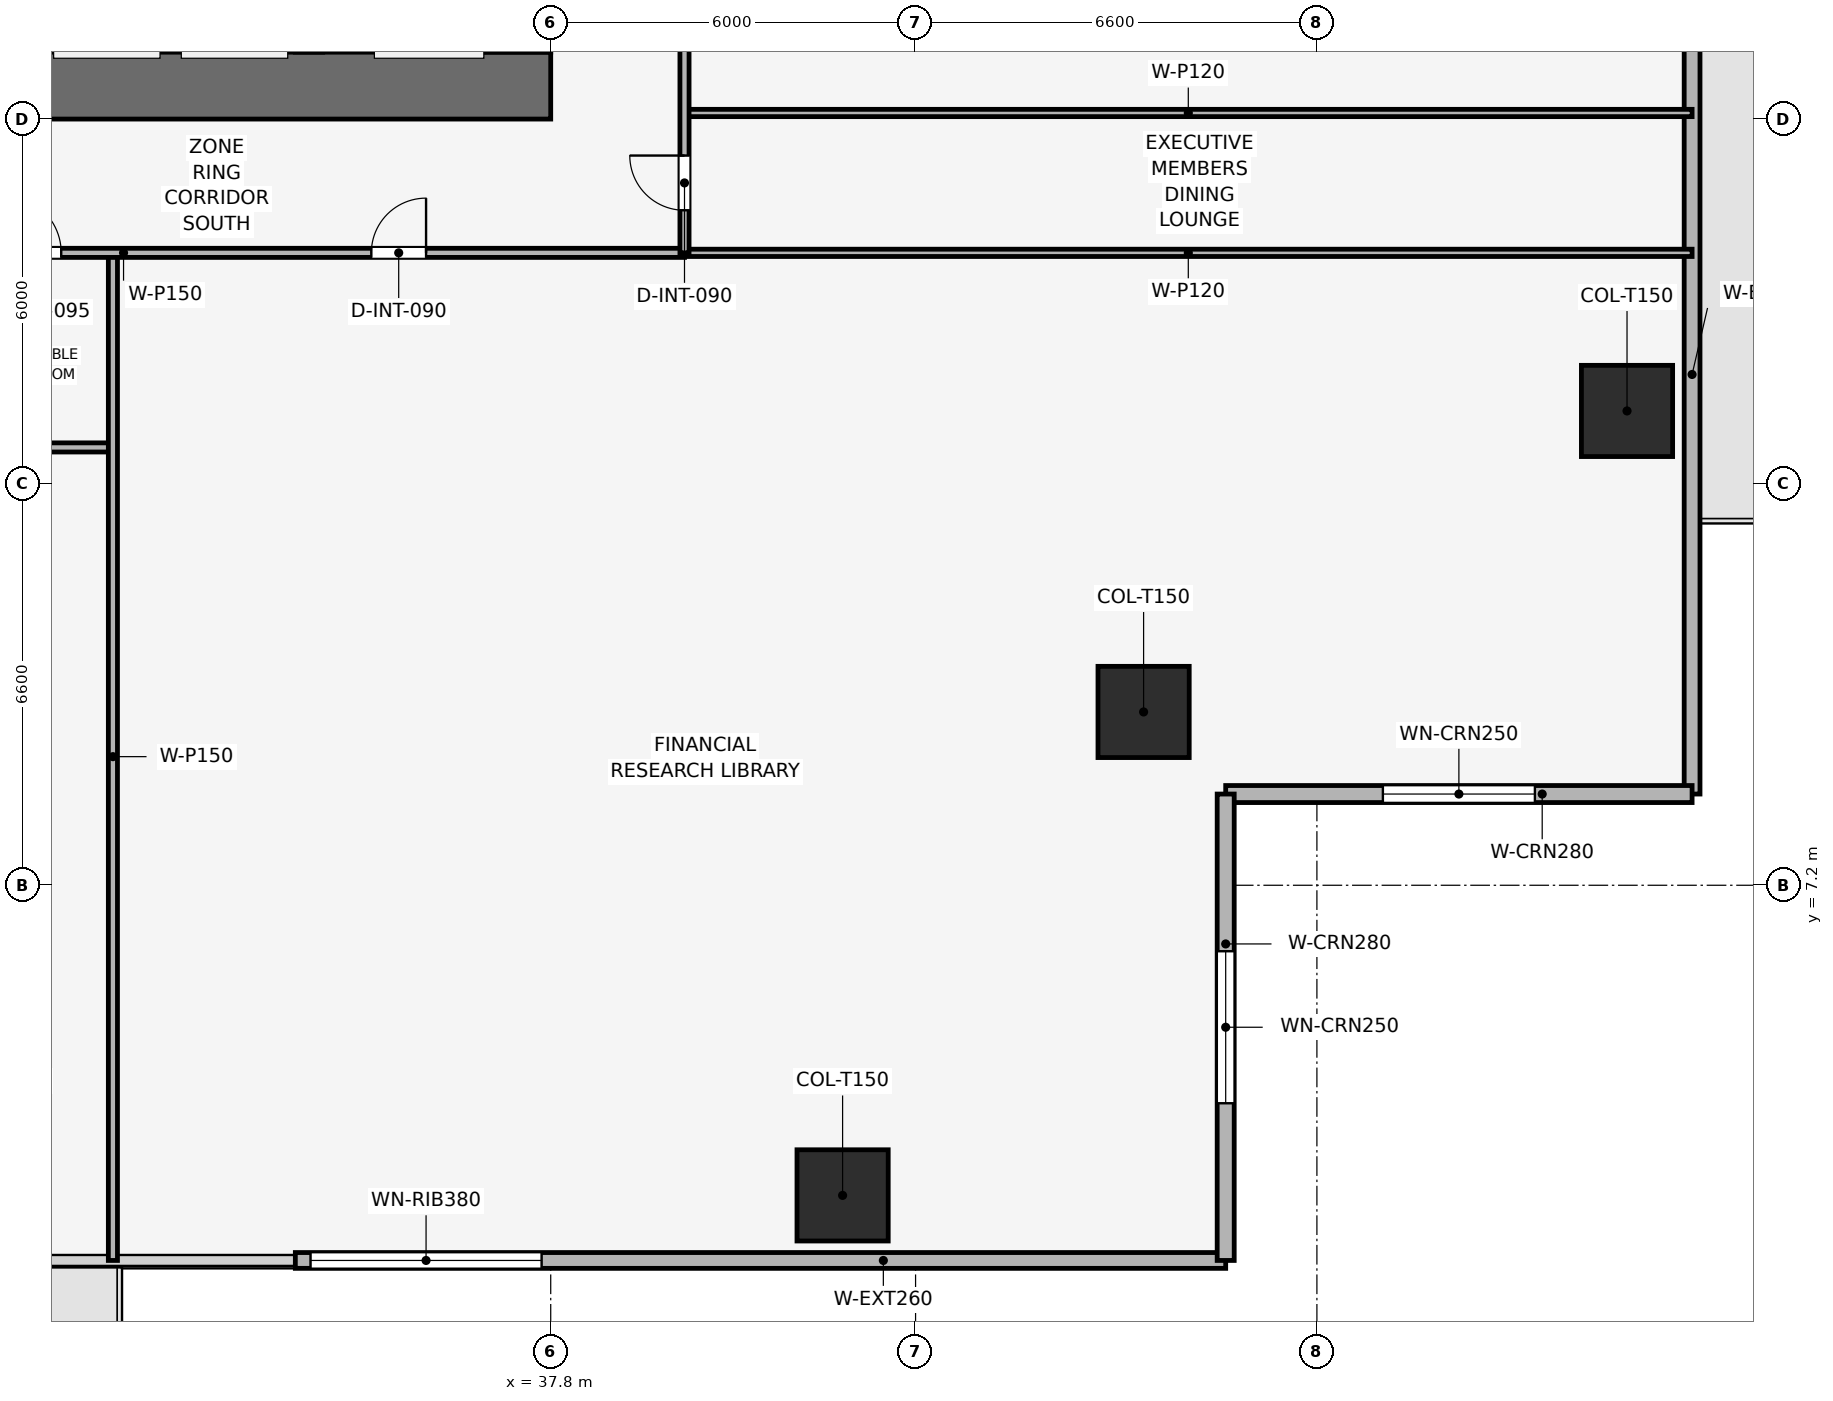
"""IFC4 building model, lengths in metres.
Left out: names, types, materials, properties, quantities, classifications, styles, units other than length and angle.
Written with IfcOpenShell. Run it as: python <this file> out.ifc"""

import sys

from ifc_helpers import new_model, si_unit, direction, frame, frame_2d, origin, origin_2d, place, context, subcontext, project, spatial, rectangle, extrude, element, fill, save


model = new_model("IFC4")
c1 = context("Model", 3, precision=1e-05, world=origin(), true_north=direction((0.0, 1.0)))
c2 = subcontext(c1, "Body", "Model", "MODEL_VIEW")
j1 = project(units=[si_unit("LENGTHUNIT", "METRE"), si_unit("PLANEANGLEUNIT", "RADIAN")], contexts=[c1])
p1 = place(None, origin())
s1 = spatial("IfcSite", under=j1, at=p1, CompositionType="ELEMENT")
p2 = place(p1, origin())
s2 = spatial("IfcBuilding", under=s1, at=p2, CompositionType="ELEMENT")
p3 = place(p2, frame((0.0, 0.0, 65.1)))
s3 = spatial("IfcBuildingStorey", under=s2, at=p3, CompositionType="ELEMENT", Elevation=65.1)
p4 = place(p3, frame((19.8, 20.35, 0.0), z_axis=(0.0, 0.0, 1.0), x_axis=(1.0, 0.0, 0.0)))
e1 = element("IfcWall", 1, at=p4, inside=s3, PredefinedType="SHEAR", context=c2, shape_type="SweptSolid", body=[
    extrude(rectangle(XDim=18.0, YDim=1.1, at=frame_2d((9.0, 0.0))), origin(), (0.0, 0.0, 1.0), 3.9),
])
p5 = place(p4, frame((8.4, 0.0, 0.0)))
e2 = element("IfcOpeningElement", 2, at=p5, cuts=e1, PredefinedType="OPENING", context=c2, shape_type="SweptSolid", body=[
    extrude(rectangle(XDim=1.2, YDim=2.2, at=frame_2d((0.6, 1.1))), frame((0.0, 0.56, 0.0), z_axis=(0.0, -1.0, 0.0), x_axis=(1.0, 0.0, 0.0)), (0.0, 0.0, 1.0), 1.12),
])
p6 = place(p3, frame((37.25, 20.9, 0.0), z_axis=(0.0, 0.0, 1.0), x_axis=(0.0, 1.0, 0.0)))
e3 = element("IfcWall", 3, at=p6, inside=s3, PredefinedType="SHEAR", context=c2, shape_type="SweptSolid", body=[
    extrude(rectangle(XDim=15.8, YDim=1.1, at=frame_2d((7.9, 0.0))), origin(), (0.0, 0.0, 1.0), 3.9),
])
p7 = place(p6, frame((4.4, 0.0, 0.0)))
e4 = element("IfcOpeningElement", 4, at=p7, cuts=e3, PredefinedType="OPENING", context=c2, shape_type="SweptSolid", body=[
    extrude(rectangle(XDim=1.1, YDim=2.15, at=frame_2d((0.55, 1.075))), frame((0.0, 0.56, 0.0), z_axis=(0.0, -1.0, 0.0), x_axis=(1.0, 0.0, 0.0)), (0.0, 0.0, 1.0), 1.12),
])
p8 = place(p3, frame((33.825, 20.9, 0.0), z_axis=(0.0, 0.0, 1.0), x_axis=(0.0, 1.0, 0.0)))
e5 = element("IfcWall", 5, at=p8, inside=s3, PredefinedType="SHEAR", context=c2, shape_type="SweptSolid", body=[
    extrude(rectangle(XDim=15.8, YDim=0.45, at=frame_2d((7.9, 0.0))), origin(), (0.0, 0.0, 1.0), 3.9),
])
for number, where, z_axis, x_axis in (
    (6, (42.6, 2.1, 0.003), (0.0, 0.0, 1.0), (1.0, 0.0, 0.0)),
    (7, (55.5, 15.0, 0.003), (0.0, 0.0, 1.0), (1.0, 0.0, 0.0)),
    (8, (47.55, 10.05, 0.003), (0.0, 0.0, 1.0), (1.0, 0.0, 0.0)),
):
    element("IfcColumn", number, at=place(p3, frame(where, z_axis=z_axis, x_axis=x_axis)), inside=s3, PredefinedType="COLUMN", context=c2, shape_type="SweptSolid", body=[
        extrude(rectangle(XDim=1.5, YDim=1.5, at=origin_2d()), origin(), (0.0, 0.0, 1.0), 3.644),
    ])
p9 = place(p3, frame((48.9, 1.03, 0.0), z_axis=(0.0, 0.0, 1.0), x_axis=(-1.0, 0.0, 0.0)))
e9 = element("IfcWall", 9, at=p9, inside=s3, PredefinedType="SOLIDWALL", context=c2, shape_type="SweptSolid", body=[
    extrude(rectangle(XDim=15.3, YDim=0.26, at=frame_2d((7.65, 0.0))), origin(), (0.0, 0.0, 1.0), 3.65),
])
p10 = place(p9, frame((11.25, 0.0, 0.9)))
e10 = element("IfcOpeningElement", 10, at=p10, cuts=e9, PredefinedType="OPENING", context=c2, shape_type="SweptSolid", body=[
    extrude(rectangle(XDim=3.8, YDim=1.9, at=frame_2d((1.9, 0.95))), frame((0.0, 0.14, 0.0), z_axis=(0.0, -1.0, 0.0), x_axis=(1.0, 0.0, 0.0)), (0.0, 0.0, 1.0), 0.28),
])
p11 = place(p3, frame((56.57, 24.0, 0.0), z_axis=(0.0, 0.0, 1.0), x_axis=(0.0, -1.0, 0.0)))
e11 = element("IfcWall", 11, at=p11, inside=s3, PredefinedType="SOLIDWALL", context=c2, shape_type="SweptSolid", body=[
    extrude(rectangle(XDim=15.3, YDim=0.26, at=frame_2d((7.65, 0.0))), origin(), (0.0, 0.0, 1.0), 3.65),
])
p12 = place(p11, frame((0.25, 0.0, 0.0)))
e12 = element("IfcOpeningElement", 12, at=p12, cuts=e11, PredefinedType="OPENING", context=c2, shape_type="SweptSolid", body=[
    extrude(rectangle(XDim=1.1, YDim=2.2, at=frame_2d((0.55, 1.1))), frame((0.0, 0.14, 0.0), z_axis=(0.0, -1.0, 0.0), x_axis=(1.0, 0.0, 0.0)), (0.0, 0.0, 1.0), 0.28),
])
p13 = place(p3, frame((56.57, 8.7, 0.0), z_axis=(0.0, 0.0, 1.0), x_axis=(-1.0, 0.0, 0.0)))
e13 = element("IfcWall", 13, at=p13, inside=s3, PredefinedType="SOLIDWALL", context=c2, shape_type="SweptSolid", body=[
    extrude(rectangle(XDim=7.67, YDim=0.28, at=frame_2d((3.835, 0.0))), origin(), (0.0, 0.0, 1.0), 3.65),
])
p14 = place(p13, frame((2.585, 0.0, 0.9)))
e14 = element("IfcOpeningElement", 14, at=p14, cuts=e13, PredefinedType="OPENING", context=c2, shape_type="SweptSolid", body=[
    extrude(rectangle(XDim=2.5, YDim=1.9, at=frame_2d((1.25, 0.95))), frame((0.0, 0.15, 0.0), z_axis=(0.0, -1.0, 0.0), x_axis=(1.0, 0.0, 0.0)), (0.0, 0.0, 1.0), 0.3),
])
p15 = place(p3, frame((48.9, 8.7, 0.0), z_axis=(0.0, 0.0, 1.0), x_axis=(0.0, -1.0, 0.0)))
e15 = element("IfcWall", 15, at=p15, inside=s3, PredefinedType="SOLIDWALL", context=c2, shape_type="SweptSolid", body=[
    extrude(rectangle(XDim=7.67, YDim=0.28, at=frame_2d((3.835, 0.0))), origin(), (0.0, 0.0, 1.0), 3.65),
])
p16 = place(p15, frame((2.585, 0.0, 0.9)))
e16 = element("IfcOpeningElement", 16, at=p16, cuts=e15, PredefinedType="OPENING", context=c2, shape_type="SweptSolid", body=[
    extrude(rectangle(XDim=2.5, YDim=1.9, at=frame_2d((1.25, 0.95))), frame((0.0, 0.15, 0.0), z_axis=(0.0, -1.0, 0.0), x_axis=(1.0, 0.0, 0.0)), (0.0, 0.0, 1.0), 0.3),
])
p17 = place(p3, frame((22.2, 14.4, 0.0), z_axis=(0.0, 0.0, 1.0), x_axis=(1.0, 0.0, 0.0)))
e17 = element("IfcWall", 17, at=p17, inside=s3, PredefinedType="PARTITIONING", context=c2, shape_type="SweptSolid", body=[
    extrude(rectangle(XDim=8.4, YDim=0.15, at=frame_2d((4.2, 0.0))), origin(), (0.0, 0.0, 1.0), 3.085),
])
p18 = place(p3, frame((30.6, 1.03, 0.0), z_axis=(0.0, 0.0, 1.0), x_axis=(0.0, 1.0, 0.0)))
e18 = element("IfcWall", 18, at=p18, inside=s3, PredefinedType="PARTITIONING", context=c2, shape_type="SweptSolid", body=[
    extrude(rectangle(XDim=16.57, YDim=0.15, at=frame_2d((8.285, 0.0))), origin(), (0.0, 0.0, 1.0), 2.935),
])
for number, where, z_axis, x_axis in (
    (19, (40.0, 17.6, 0.0), (0.0, 0.0, 1.0), (1.0, 0.0, 0.0)),
    (20, (40.0, 19.9, 0.0), (0.0, 0.0, 1.0), (1.0, 0.0, 0.0)),
):
    element("IfcWall", number, at=place(p3, frame(where, z_axis=z_axis, x_axis=x_axis)), inside=s3, PredefinedType="PARTITIONING", context=c2, shape_type="SweptSolid", body=[
        extrude(rectangle(XDim=16.57, YDim=0.12, at=frame_2d((8.285, 0.0))), origin(), (0.0, 0.0, 1.0), 2.935),
    ])
p19 = place(p3, frame((17.6, 17.6, 0.0), z_axis=(0.0, 0.0, 1.0), x_axis=(1.0, 0.0, 0.0)))
e21 = element("IfcWall", 21, at=p19, inside=s3, PredefinedType="PARTITIONING", context=c2, shape_type="SweptSolid", body=[
    extrude(rectangle(XDim=22.4, YDim=0.15, at=frame_2d((11.2, 0.0))), origin(), (0.0, 0.0, 1.0), 3.085),
])
p20 = place(p19, frame((1.85, 0.0, 0.0)))
e22 = element("IfcOpeningElement", 22, at=p20, cuts=e21, PredefinedType="OPENING", context=c2, shape_type="SweptSolid", body=[
    extrude(rectangle(XDim=0.9, YDim=2.1, at=frame_2d((0.45, 1.05))), frame((0.0, 0.085, 0.0), z_axis=(0.0, -1.0, 0.0), x_axis=(1.0, 0.0, 0.0)), (0.0, 0.0, 1.0), 0.17),
])
p21 = place(p19, frame((5.55, 0.0, 0.0)))
e23 = element("IfcOpeningElement", 23, at=p21, cuts=e21, PredefinedType="OPENING", context=c2, shape_type="SweptSolid", body=[
    extrude(rectangle(XDim=0.9, YDim=2.1, at=frame_2d((0.45, 1.05))), frame((0.0, 0.085, 0.0), z_axis=(0.0, -1.0, 0.0), x_axis=(1.0, 0.0, 0.0)), (0.0, 0.0, 1.0), 0.17),
])
p22 = place(p19, frame((8.45, 0.0, 0.0)))
e24 = element("IfcOpeningElement", 24, at=p22, cuts=e21, PredefinedType="OPENING", context=c2, shape_type="SweptSolid", body=[
    extrude(rectangle(XDim=0.9, YDim=2.1, at=frame_2d((0.45, 1.05))), frame((0.0, 0.085, 0.0), z_axis=(0.0, -1.0, 0.0), x_axis=(1.0, 0.0, 0.0)), (0.0, 0.0, 1.0), 0.17),
])
p23 = place(p19, frame((11.2, 0.0, 0.0)))
e25 = element("IfcOpeningElement", 25, at=p23, cuts=e21, PredefinedType="OPENING", context=c2, shape_type="SweptSolid", body=[
    extrude(rectangle(XDim=0.95, YDim=2.1, at=frame_2d((0.475, 1.05))), frame((0.0, 0.085, 0.0), z_axis=(0.0, -1.0, 0.0), x_axis=(1.0, 0.0, 0.0)), (0.0, 0.0, 1.0), 0.17),
])
p24 = place(p19, frame((17.25, 0.0, 0.0)))
e26 = element("IfcOpeningElement", 26, at=p24, cuts=e21, PredefinedType="OPENING", context=c2, shape_type="SweptSolid", body=[
    extrude(rectangle(XDim=0.9, YDim=2.1, at=frame_2d((0.45, 1.05))), frame((0.0, 0.085, 0.0), z_axis=(0.0, -1.0, 0.0), x_axis=(1.0, 0.0, 0.0)), (0.0, 0.0, 1.0), 0.17),
])
p25 = place(p3, frame((40.0, 17.6, 0.0), z_axis=(0.0, 0.0, 1.0), x_axis=(0.0, 1.0, 0.0)))
e27 = element("IfcWall", 27, at=p25, inside=s3, PredefinedType="PARTITIONING", context=c2, shape_type="SweptSolid", body=[
    extrude(rectangle(XDim=22.4, YDim=0.15, at=frame_2d((11.2, 0.0))), origin(), (0.0, 0.0, 1.0), 3.085),
])
p26 = place(p25, frame((0.7, 0.0, 0.0)))
e28 = element("IfcOpeningElement", 28, at=p26, cuts=e27, PredefinedType="OPENING", context=c2, shape_type="SweptSolid", body=[
    extrude(rectangle(XDim=0.9, YDim=2.1, at=frame_2d((0.45, 1.05))), frame((0.0, 0.085, 0.0), z_axis=(0.0, -1.0, 0.0), x_axis=(1.0, 0.0, 0.0)), (0.0, 0.0, 1.0), 0.17),
])
p27 = place(p25, frame((4.699, 0.0, 0.0)))
e29 = element("IfcOpeningElement", 29, at=p27, cuts=e27, PredefinedType="OPENING", context=c2, shape_type="SweptSolid", body=[
    extrude(rectangle(XDim=0.9, YDim=2.1, at=frame_2d((0.45, 1.05))), frame((0.0, 0.085, 0.0), z_axis=(0.0, -1.0, 0.0), x_axis=(1.0, 0.0, 0.0)), (0.0, 0.0, 1.0), 0.17),
])
p28 = place(p25, frame((10.692, 0.0, 0.0)))
e30 = element("IfcOpeningElement", 30, at=p28, cuts=e27, PredefinedType="OPENING", context=c2, shape_type="SweptSolid", body=[
    extrude(rectangle(XDim=0.9, YDim=2.1, at=frame_2d((0.45, 1.05))), frame((0.0, 0.085, 0.0), z_axis=(0.0, -1.0, 0.0), x_axis=(1.0, 0.0, 0.0)), (0.0, 0.0, 1.0), 0.17),
])
p29 = place(p25, frame((17.892, 0.0, 0.0)))
e31 = element("IfcOpeningElement", 31, at=p29, cuts=e27, PredefinedType="OPENING", context=c2, shape_type="SweptSolid", body=[
    extrude(rectangle(XDim=0.9, YDim=2.1, at=frame_2d((0.45, 1.05))), frame((0.0, 0.085, 0.0), z_axis=(0.0, -1.0, 0.0), x_axis=(1.0, 0.0, 0.0)), (0.0, 0.0, 1.0), 0.17),
])
p30 = place(p10, origin())
e32 = element("IfcWindow", 32, at=p30, inside=s3, PartitioningType="SINGLE_PANEL", PredefinedType="WINDOW", context=c2, shape_type="SweptSolid", body=[
    extrude(rectangle(XDim=3.8, YDim=1.9, at=frame_2d((1.9, 0.95))), frame((0.0, 0.03, 0.0), z_axis=(0.0, -1.0, 0.0), x_axis=(1.0, 0.0, 0.0)), (0.0, 0.0, 1.0), 0.06),
])
fill(e10, e32)
p31 = place(p14, origin())
e33 = element("IfcWindow", 33, at=p31, inside=s3, PartitioningType="SINGLE_PANEL", PredefinedType="WINDOW", context=c2, shape_type="SweptSolid", body=[
    extrude(rectangle(XDim=2.5, YDim=1.9, at=frame_2d((1.25, 0.95))), frame((0.0, 0.03, 0.0), z_axis=(0.0, -1.0, 0.0), x_axis=(1.0, 0.0, 0.0)), (0.0, 0.0, 1.0), 0.06),
])
fill(e14, e33)
p32 = place(p16, origin())
e34 = element("IfcWindow", 34, at=p32, inside=s3, PartitioningType="SINGLE_PANEL", PredefinedType="WINDOW", context=c2, shape_type="SweptSolid", body=[
    extrude(rectangle(XDim=2.5, YDim=1.9, at=frame_2d((1.25, 0.95))), frame((0.0, 0.03, 0.0), z_axis=(0.0, -1.0, 0.0), x_axis=(1.0, 0.0, 0.0)), (0.0, 0.0, 1.0), 0.06),
])
fill(e16, e34)
p33 = place(p23, origin())
e35 = element("IfcDoor", 35, at=p33, inside=s3, OperationType="SINGLE_SWING_LEFT", PredefinedType="DOOR", context=c2, shape_type="SweptSolid", body=[
    extrude(rectangle(XDim=0.95, YDim=2.1, at=frame_2d((0.475, 1.05))), frame((0.0, 0.025, 0.0), z_axis=(0.0, -1.0, 0.0), x_axis=(1.0, 0.0, 0.0)), (0.0, 0.0, 1.0), 0.05),
])
fill(e25, e35)
p34 = place(p24, origin())
e36 = element("IfcDoor", 36, at=p34, inside=s3, OperationType="SINGLE_SWING_RIGHT", PredefinedType="DOOR", context=c2, shape_type="SweptSolid", body=[
    extrude(rectangle(XDim=0.9, YDim=2.1, at=frame_2d((0.45, 1.05))), frame((0.0, 0.025, 0.0), z_axis=(0.0, -1.0, 0.0), x_axis=(1.0, 0.0, 0.0)), (0.0, 0.0, 1.0), 0.05),
])
fill(e26, e36)
p35 = place(p26, origin())
e37 = element("IfcDoor", 37, at=p35, inside=s3, OperationType="SINGLE_SWING_RIGHT", PredefinedType="DOOR", context=c2, shape_type="SweptSolid", body=[
    extrude(rectangle(XDim=0.9, YDim=2.1, at=frame_2d((0.45, 1.05))), frame((0.0, 0.025, 0.0), z_axis=(0.0, -1.0, 0.0), x_axis=(1.0, 0.0, 0.0)), (0.0, 0.0, 1.0), 0.05),
])
fill(e28, e37)
save(model, sys.argv[1])
